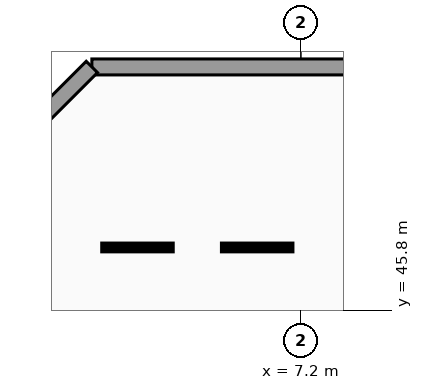
"""IFC4 building model, lengths in metres.
Left out: names, types, materials, properties, quantities, classifications, styles, units other than length and angle.
Written with IfcOpenShell. Run it as: python <this file> out.ifc"""

import sys

from ifc_helpers import new_model, si_unit, direction, frame, frame_2d, origin, place, context, subcontext, project, spatial, rectangle, extrude, element, save


model = new_model("IFC4")
c1 = context("Model", 3, precision=1e-05, world=origin(), true_north=direction((0.0, 1.0)))
c2 = subcontext(c1, "Body", "Model", "MODEL_VIEW")
j1 = project(units=[si_unit("LENGTHUNIT", "METRE"), si_unit("PLANEANGLEUNIT", "RADIAN")], contexts=[c1])
p1 = place(None, origin())
s1 = spatial("IfcSite", under=j1, at=p1, CompositionType="ELEMENT")
p2 = place(p1, origin())
s2 = spatial("IfcBuilding", under=s1, at=p2, CompositionType="ELEMENT")
p3 = place(p2, frame((0.0, 0.0, -4.08)))
s3 = spatial("IfcBuildingStorey", under=s2, at=p3, CompositionType="ELEMENT", Elevation=-4.08)
p4 = place(p3, frame((1.7, 52.2, 0.0), z_axis=(0.0, 0.0, 1.0), x_axis=(1.0, 0.0, 0.0)))
e1 = element("IfcWall", 1, at=p4, inside=s3, PredefinedType="SOLIDWALL", context=c2, shape_type="SweptSolid", body=[
    extrude(rectangle(XDim=73.4, YDim=0.42, at=frame_2d((36.7, 0.0))), origin(), (0.0, 0.0, 1.0), 3.76),
])
p5 = place(p3, frame((-2.5, 48.0, 0.0), z_axis=(0.0, 0.0, 1.0), x_axis=(0.707106781187, 0.707106781187, 0.0)))
e2 = element("IfcWall", 2, at=p5, inside=s3, PredefinedType="SOLIDWALL", context=c2, shape_type="SweptSolid", body=[
    extrude(rectangle(XDim=5.94, YDim=0.42, at=frame_2d((2.97, 0.0))), origin(), (0.0, 0.0, 1.0), 3.76),
])
save(model, sys.argv[1])
